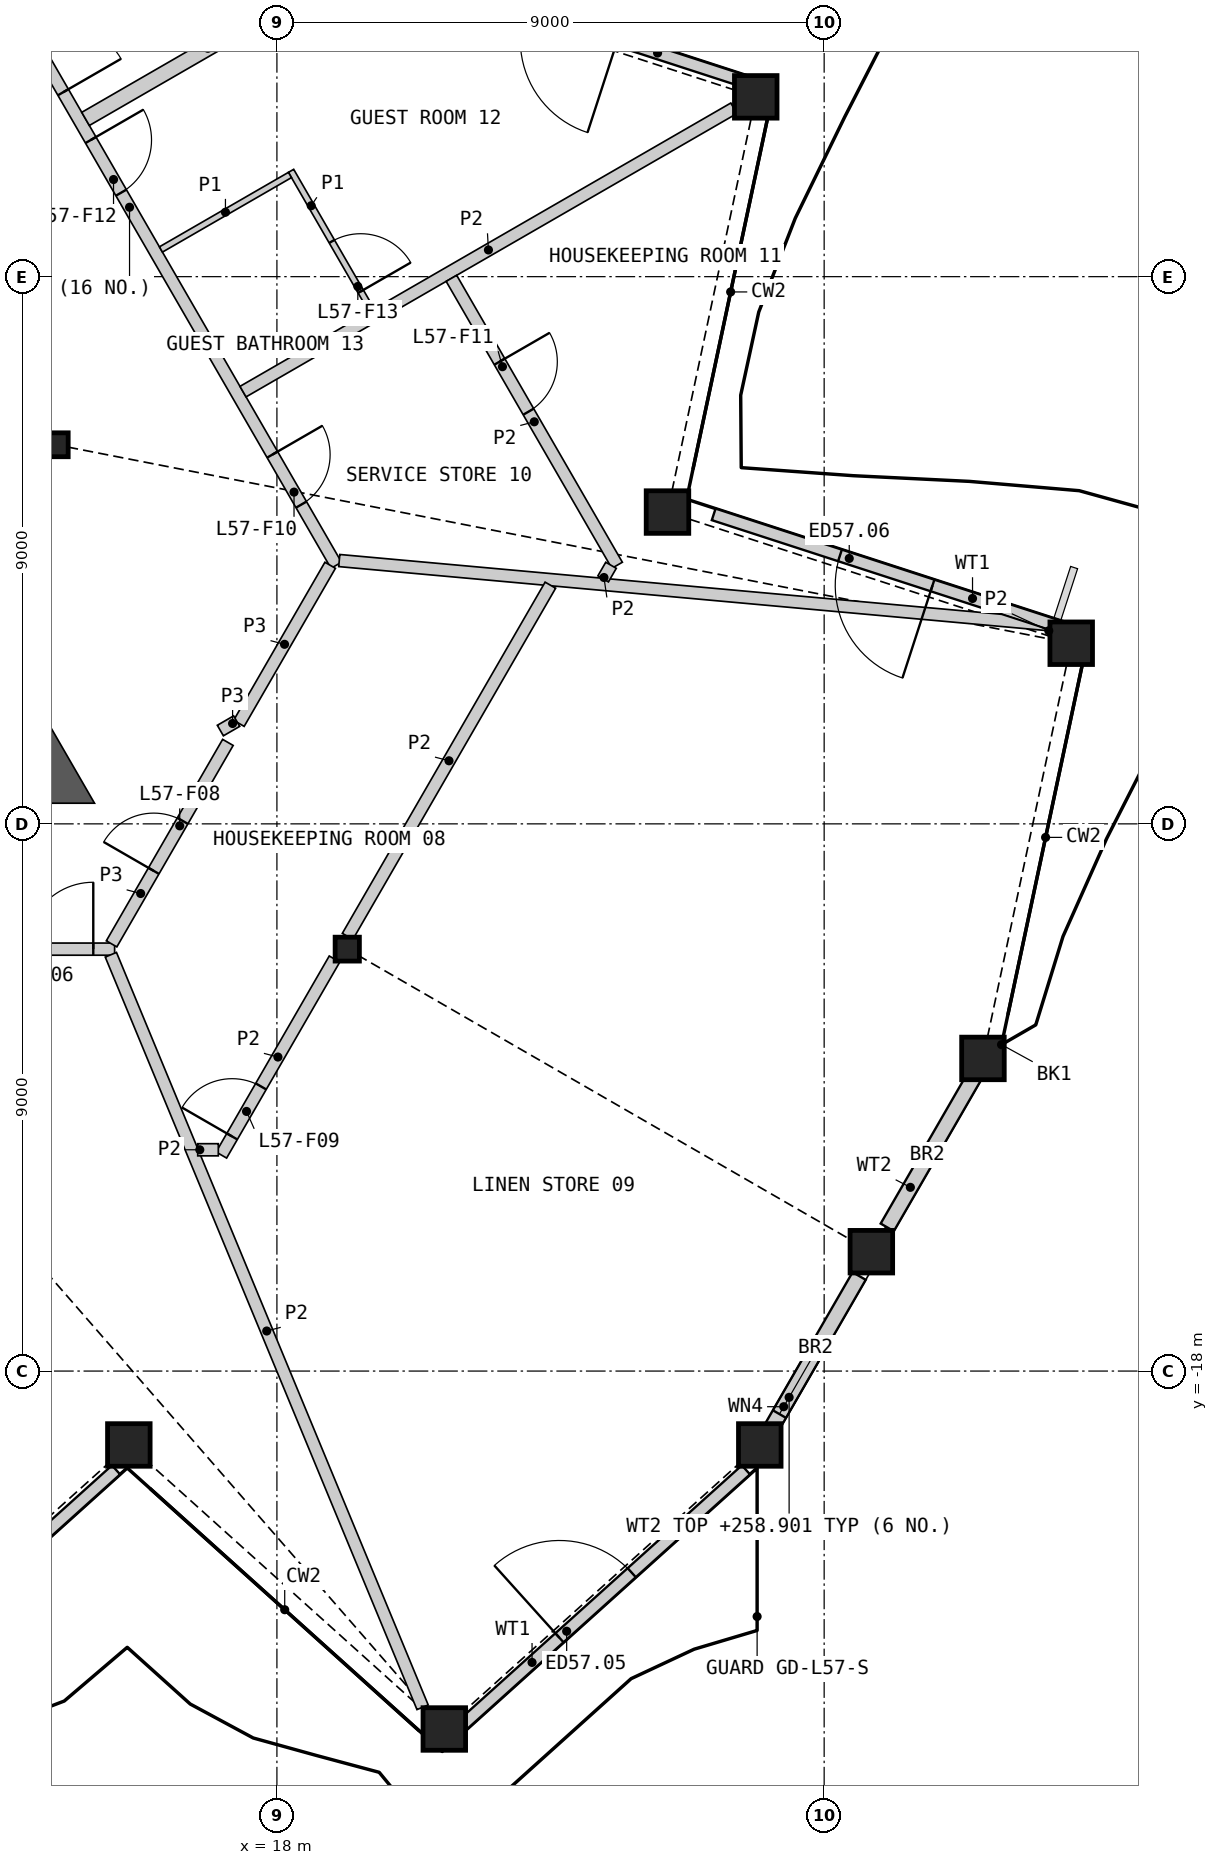
"""IFC4 building model, lengths in metres.
Left out: names, types, materials, properties, quantities, classifications, styles, units other than length and angle.
Written with IfcOpenShell. Run it as: python <this file> out.ifc"""

import sys

from ifc_helpers import new_model, si_unit, direction, frame, frame_2d, origin, origin_2d, place, context, subcontext, project, spatial, polyline, rectangle, hollow_rectangle, i_section, outline, extrude, element, fill, save


model = new_model("IFC4")
c1 = context("Model", 3, precision=1e-05, world=origin(), true_north=direction((0.0, 1.0)))
c2 = subcontext(c1, "Body", "Model", "MODEL_VIEW")
j1 = project(units=[si_unit("LENGTHUNIT", "METRE"), si_unit("PLANEANGLEUNIT", "RADIAN")], contexts=[c1])
p1 = place(None, origin())
s1 = spatial("IfcSite", under=j1, at=p1, CompositionType="ELEMENT")
p2 = place(p1, origin())
s2 = spatial("IfcBuilding", under=s1, at=p2, CompositionType="ELEMENT")
p3 = place(p2, frame((0.0, 0.0, 256.2)))
s3 = spatial("IfcBuildingStorey", under=s2, at=p3, CompositionType="ELEMENT", Elevation=256.2)
for number, where, z_axis, x_axis in (
    (1, (15.565, -19.215, 0.0), (0.0, 0.0, 1.0), (1.0, 0.0, 0.0)),
    (2, (20.753, -23.887, 0.0), (0.0, 0.0, 1.0), (1.0, 0.0, 0.0)),
    (3, (25.941, -19.215, 0.0), (0.0, 0.0, 1.0), (1.0, 0.0, 0.0)),
    (4, (27.776, -16.037, 0.0), (0.0, 0.0, 1.0), (1.0, 0.0, 0.0)),
    (5, (29.612, -12.858, 0.0), (0.0, 0.0, 1.0), (1.0, 0.0, 0.0)),
    (6, (31.063, -6.029, 0.0), (0.0, 0.0, 1.0), (1.0, 0.0, 0.0)),
    (7, (24.423, -3.872, 0.0), (0.0, 0.0, 1.0), (1.0, 0.0, 0.0)),
    (8, (25.875, 2.957, 0.0), (0.0, 0.0, 1.0), (1.0, 0.0, 0.0)),
):
    element("IfcColumn", number, at=place(p3, frame(where, z_axis=z_axis, x_axis=x_axis)), inside=s3, PredefinedType="COLUMN", context=c2, shape_type="SweptSolid", body=[
        extrude(hollow_rectangle(XDim=0.7, YDim=0.7, WallThickness=0.045, at=origin_2d()), origin(), (0.0, 0.0, 1.0), 3.6),
    ])
for number, where, z_axis, x_axis in (
    (9, (19.157, -11.06, 0.0), (0.0, 0.0, 1.0), (1.0, 0.0, 0.0)),
    (10, (14.368, -2.765, 0.0), (0.0, 0.0, 1.0), (1.0, 0.0, 0.0)),
):
    element("IfcColumn", number, at=place(p3, frame(where, z_axis=z_axis, x_axis=x_axis)), inside=s3, PredefinedType="COLUMN", context=c2, shape_type="SweptSolid", body=[
        extrude(i_section(OverallWidth=0.399, OverallDepth=0.393, WebThickness=0.023, FlangeThickness=0.037, at=origin_2d()), origin(), (0.0, 0.0, 1.0), 3.6),
    ])
p4 = place(p3, frame((10.664, -23.848, 0.0), z_axis=(0.0, 0.0, 1.0), x_axis=(0.74314024121, 0.669135697668, 0.0)))
e11 = element("IfcWall", 11, at=p4, inside=s3, PredefinedType="SOLIDWALL", context=c2, shape_type="SweptSolid", body=[
    extrude(rectangle(XDim=6.311, YDim=0.2, at=frame_2d((3.156, 0.0))), origin(), (0.0, 0.0, 1.0), 2.701),
])
p5 = place(p4, frame((2.184, 0.0, 0.0)))
e12 = element("IfcOpeningElement", 12, at=p5, cuts=e11, PredefinedType="OPENING", context=c2, shape_type="SweptSolid", body=[
    extrude(rectangle(XDim=1.6, YDim=2.4, at=frame_2d((0.8, 1.2))), frame((0.0, 0.11, 0.0), z_axis=(0.0, -1.0, 0.0), x_axis=(1.0, 0.0, 0.0)), (0.0, 0.0, 1.0), 0.22),
])
p6 = place(p3, frame((21.023, -23.848, 0.0), z_axis=(0.0, 0.0, 1.0), x_axis=(0.74314024121, 0.669135697668, 0.0)))
e13 = element("IfcWall", 13, at=p6, inside=s3, PredefinedType="SOLIDWALL", context=c2, shape_type="SweptSolid", body=[
    extrude(rectangle(XDim=6.311, YDim=0.2, at=frame_2d((3.156, 0.0))), origin(), (0.0, 0.0, 1.0), 2.701),
])
p7 = place(p6, frame((2.184, 0.0, 0.0)))
e14 = element("IfcOpeningElement", 14, at=p7, cuts=e13, PredefinedType="OPENING", context=c2, shape_type="SweptSolid", body=[
    extrude(rectangle(XDim=1.6, YDim=2.4, at=frame_2d((0.8, 1.2))), frame((0.0, 0.11, 0.0), z_axis=(0.0, -1.0, 0.0), x_axis=(1.0, 0.0, 0.0)), (0.0, 0.0, 1.0), 0.22),
])
p8 = place(p3, frame((26.04, -19.097, 0.0), z_axis=(0.0, 0.0, 1.0), x_axis=(0.499976998774, 0.866038683141, 0.0)))
e15 = element("IfcWall", 15, at=p8, inside=s3, PredefinedType="SOLIDWALL", context=c2, shape_type="SweptSolid", body=[
    extrude(rectangle(XDim=3.072, YDim=0.25, at=frame_2d((1.536, 0.0))), origin(), (0.0, 0.0, 1.0), 2.701),
])
p9 = place(p8, frame((0.45, 0.0, 1.8)))
e16 = element("IfcOpeningElement", 16, at=p9, cuts=e15, PredefinedType="OPENING", context=c2, shape_type="SweptSolid", body=[
    extrude(rectangle(XDim=1.4, YDim=0.7, at=frame_2d((0.7, 0.35))), frame((0.0, 0.135, 0.0), z_axis=(0.0, -1.0, 0.0), x_axis=(1.0, 0.0, 0.0)), (0.0, 0.0, 1.0), 0.27),
])
p10 = place(p3, frame((28.038, -15.637, 0.0), z_axis=(0.0, 0.0, 1.0), x_axis=(0.500023511883, 0.866011828767, 0.0)))
e17 = element("IfcWall", 17, at=p10, inside=s3, PredefinedType="SOLIDWALL", context=c2, shape_type="SweptSolid", body=[
    extrude(rectangle(XDim=3.042, YDim=0.25, at=frame_2d((1.521, 0.0))), origin(), (0.0, 0.0, 1.0), 2.701),
])
p11 = place(p3, frame((30.859, -5.754, 0.0), z_axis=(0.0, 0.0, 1.0), x_axis=(-0.951049400374, 0.309038894069, 0.0)))
e18 = element("IfcWall", 18, at=p11, inside=s3, PredefinedType="SOLIDWALL", context=c2, shape_type="SweptSolid", body=[
    extrude(rectangle(XDim=5.968, YDim=0.2, at=frame_2d((2.984, 0.0))), origin(), (0.0, 0.0, 1.0), 2.701),
])
p12 = place(p11, frame((2.184, 0.0, 0.0)))
e19 = element("IfcOpeningElement", 19, at=p12, cuts=e18, PredefinedType="OPENING", context=c2, shape_type="SweptSolid", body=[
    extrude(rectangle(XDim=1.6, YDim=2.4, at=frame_2d((0.8, 1.2))), frame((0.0, 0.11, 0.0), z_axis=(0.0, -1.0, 0.0), x_axis=(1.0, 0.0, 0.0)), (0.0, 0.0, 1.0), 0.22),
])
p13 = place(p3, frame((25.679, 3.217, 0.0), z_axis=(0.0, 0.0, 1.0), x_axis=(-0.951049400374, 0.309038894069, 0.0)))
e20 = element("IfcWall", 20, at=p13, inside=s3, PredefinedType="SOLIDWALL", context=c2, shape_type="SweptSolid", body=[
    extrude(rectangle(XDim=5.968, YDim=0.2, at=frame_2d((2.984, 0.0))), origin(), (0.0, 0.0, 1.0), 2.701),
])
p14 = place(p13, frame((2.184, 0.0, 0.0)))
e21 = element("IfcOpeningElement", 21, at=p14, cuts=e20, PredefinedType="OPENING", context=c2, shape_type="SweptSolid", body=[
    extrude(rectangle(XDim=1.6, YDim=2.4, at=frame_2d((0.8, 1.2))), frame((0.0, 0.11, 0.0), z_axis=(0.0, -1.0, 0.0), x_axis=(1.0, 0.0, 0.0)), (0.0, 0.0, 1.0), 0.22),
])
p15 = place(p3, origin())
e22 = element("IfcWall", 22, at=p15, inside=s3, PredefinedType="SHEAR", context=c2, shape_type="SweptSolid", body=[
    extrude(outline(polyline([(12.748, -8.66), (12.748, -7.36), (13.874, -6.71), (15.0, -8.66), (12.748, -8.66)])), origin(), (0.0, 0.0, 1.0), 3.25),
])
p16 = place(p3, frame((5.377, 18.807, 0.0), z_axis=(0.0, 0.0, 1.0), x_axis=(0.499999852422, -0.866025488988, 0.0)))
e23 = element("IfcWall", 23, at=p16, inside=s3, PredefinedType="PARTITIONING", context=c2, shape_type="SweptSolid", body=[
    extrude(rectangle(XDim=27.198, YDim=0.2, at=frame_2d((13.599, 0.0))), origin(), (0.0, 0.0, 1.0), 3.25),
])
p17 = place(p16, frame((25.096, 0.0, 0.0)))
e24 = element("IfcOpeningElement", 24, at=p17, cuts=e23, PredefinedType="OPENING", context=c2, shape_type="SweptSolid", body=[
    extrude(rectangle(XDim=0.95, YDim=2.1, at=frame_2d((0.475, 1.05))), frame((0.0, 0.11, 0.0), z_axis=(0.0, -1.0, 0.0), x_axis=(1.0, 0.0, 0.0)), (0.0, 0.0, 1.0), 0.22),
])
p18 = place(p16, frame((19.122, 0.0, 0.0)))
e25 = element("IfcOpeningElement", 25, at=p18, cuts=e23, PredefinedType="OPENING", context=c2, shape_type="SweptSolid", body=[
    extrude(rectangle(XDim=1.0, YDim=2.1, at=frame_2d((0.5, 1.05))), frame((0.0, 0.11, 0.0), z_axis=(0.0, -1.0, 0.0), x_axis=(1.0, 0.0, 0.0)), (0.0, 0.0, 1.0), 0.22),
])
p19 = place(p16, frame((17.115, 0.0, 0.0)))
e26 = element("IfcOpeningElement", 26, at=p19, cuts=e23, PredefinedType="OPENING", context=c2, shape_type="SweptSolid", body=[
    extrude(rectangle(XDim=1.1, YDim=2.1, at=frame_2d((0.55, 1.05))), frame((0.0, 0.11, 0.0), z_axis=(0.0, -1.0, 0.0), x_axis=(1.0, 0.0, 0.0)), (0.0, 0.0, 1.0), 0.22),
])
p20 = place(p16, frame((0.35, 0.0, 0.0)))
e27 = element("IfcOpeningElement", 27, at=p20, cuts=e23, PredefinedType="OPENING", context=c2, shape_type="SweptSolid", body=[
    extrude(rectangle(XDim=1.1, YDim=2.1, at=frame_2d((0.55, 1.05))), frame((0.0, 0.11, 0.0), z_axis=(0.0, -1.0, 0.0), x_axis=(1.0, 0.0, 0.0)), (0.0, 0.0, 1.0), 0.22),
])
p21 = place(p3, frame((9.788, -11.06, 0.0), z_axis=(0.0, 0.0, 1.0), x_axis=(1.0, 0.0, 0.0)))
e28 = element("IfcWall", 28, at=p21, inside=s3, PredefinedType="PARTITIONING", context=c2, shape_type="SweptSolid", body=[
    extrude(rectangle(XDim=5.543, YDim=0.2, at=frame_2d((2.771, 0.0))), origin(), (0.0, 0.0, 1.0), 3.25),
])
p22 = place(p21, frame((4.092, 0.0, 0.0)))
e29 = element("IfcOpeningElement", 29, at=p22, cuts=e28, PredefinedType="OPENING", context=c2, shape_type="SweptSolid", body=[
    extrude(rectangle(XDim=1.1, YDim=2.1, at=frame_2d((0.55, 1.05))), frame((0.0, 0.11, 0.0), z_axis=(0.0, -1.0, 0.0), x_axis=(1.0, 0.0, 0.0)), (0.0, 0.0, 1.0), 0.22),
])
p23 = place(p3, frame((14.853, 2.594, 0.0), z_axis=(0.0, 0.0, 1.0), x_axis=(0.866021891294, 0.500006083763, 0.0)))
e30 = element("IfcWall", 30, at=p23, inside=s3, PredefinedType="PARTITIONING", context=c2, shape_type="SweptSolid", body=[
    extrude(rectangle(XDim=4.645, YDim=0.25, at=frame_2d((2.322, 0.0))), origin(), (0.0, 0.0, 1.0), 2.404),
])
p24 = place(p3, frame((15.281, -10.974, 0.0), z_axis=(0.0, 0.0, 1.0), x_axis=(0.499989446428, 0.866031496806, 0.0)))
e31 = element("IfcWall", 31, at=p24, inside=s3, PredefinedType="PARTITIONING", context=c2, shape_type="SweptSolid", body=[
    extrude(rectangle(XDim=3.826, YDim=0.2, at=frame_2d((1.913, 0.0))), origin(), (0.0, 0.0, 1.0), 3.25),
])
p25 = place(p24, frame((1.386, 0.0, 0.0)))
e32 = element("IfcOpeningElement", 32, at=p25, cuts=e31, PredefinedType="OPENING", context=c2, shape_type="SweptSolid", body=[
    extrude(rectangle(XDim=0.95, YDim=2.1, at=frame_2d((0.475, 1.05))), frame((0.0, 0.11, 0.0), z_axis=(0.0, -1.0, 0.0), x_axis=(1.0, 0.0, 0.0)), (0.0, 0.0, 1.0), 0.22),
])
p26 = place(p3, frame((17.375, -7.347, 0.0), z_axis=(0.0, 0.0, 1.0), x_axis=(0.499952404951, 0.866052881055, 0.0)))
e33 = element("IfcWall", 33, at=p26, inside=s3, PredefinedType="PARTITIONING", context=c2, shape_type="SweptSolid", body=[
    extrude(rectangle(XDim=3.002, YDim=0.2, at=frame_2d((1.501, 0.0))), origin(), (0.0, 0.0, 1.0), 3.25),
])
p27 = place(p3, frame((17.07, -7.465, 0.0), z_axis=(0.0, 0.0, 1.0), x_axis=(0.866054481515, 0.499949632511, 0.0)))
e34 = element("IfcWall", 34, at=p27, inside=s3, PredefinedType="PARTITIONING", context=c2, shape_type="SweptSolid", body=[
    extrude(rectangle(XDim=0.31, YDim=0.2, at=frame_2d((0.155, 0.0))), origin(), (0.0, 0.0, 1.0), 3.25),
])
p28 = place(p3, frame((15.269, -11.153, 0.0), z_axis=(0.0, 0.0, 1.0), x_axis=(0.382692998932, -0.923875569851, 0.0)))
e35 = element("IfcWall", 35, at=p28, inside=s3, PredefinedType="PARTITIONING", context=c2, shape_type="SweptSolid", body=[
    extrude(rectangle(XDim=13.397, YDim=0.2, at=frame_2d((6.698, 0.0))), origin(), (0.0, 0.0, 1.0), 2.404),
])
p29 = place(p3, origin())
e36 = element("IfcWall", 36, at=p29, inside=s3, PredefinedType="PARTITIONING", context=c2, shape_type="SweptSolid", body=[
    extrude(outline(polyline([(30.694, -5.824), (19.017, -4.769), (19.034, -4.57), (29.918, -5.553), (30.696, -5.806), (30.694, -5.824)])), origin(), (0.0, 0.0, 1.0), 2.404),
])
p30 = place(p3, frame((17.443, -1.891, 0.0), z_axis=(0.0, 0.0, 1.0), x_axis=(0.866019838429, 0.500009639354, 0.0)))
e37 = element("IfcWall", 37, at=p30, inside=s3, PredefinedType="PARTITIONING", context=c2, shape_type="SweptSolid", body=[
    extrude(rectangle(XDim=9.321, YDim=0.2, at=frame_2d((4.661, 0.0))), origin(), (0.0, 0.0, 1.0), 2.404),
])
p31 = place(p3, frame((19.162, -10.851, 0.0), z_axis=(0.0, 0.0, 1.0), x_axis=(0.500008654708, 0.866020406929, 0.0)))
e38 = element("IfcWall", 38, at=p31, inside=s3, PredefinedType="PARTITIONING", context=c2, shape_type="SweptSolid", body=[
    extrude(rectangle(XDim=6.67, YDim=0.2, at=frame_2d((3.335, 0.0))), origin(), (0.0, 0.0, 1.0), 2.404),
])
p32 = place(p3, frame((20.87, -0.028, 0.0), z_axis=(0.0, 0.0, 1.0), x_axis=(0.499993928037, -0.866028909405, 0.0)))
e39 = element("IfcWall", 39, at=p32, inside=s3, PredefinedType="PARTITIONING", context=c2, shape_type="SweptSolid", body=[
    extrude(rectangle(XDim=5.449, YDim=0.2, at=frame_2d((2.725, 0.0))), origin(), (0.0, 0.0, 1.0), 2.404),
])
p33 = place(p32, frame((1.583, 0.0, 0.0)))
e40 = element("IfcOpeningElement", 40, at=p33, cuts=e39, PredefinedType="OPENING", context=c2, shape_type="SweptSolid", body=[
    extrude(rectangle(XDim=0.95, YDim=2.1, at=frame_2d((0.475, 1.05))), frame((0.0, 0.11, 0.0), z_axis=(0.0, -1.0, 0.0), x_axis=(1.0, 0.0, 0.0)), (0.0, 0.0, 1.0), 0.22),
])
p34 = place(p3, frame((17.086, -14.447, 0.0), z_axis=(0.0, 0.0, 1.0), x_axis=(0.500004411858, 0.866022856582, 0.0)))
e41 = element("IfcWall", 41, at=p34, inside=s3, PredefinedType="PARTITIONING", context=c2, shape_type="SweptSolid", body=[
    extrude(rectangle(XDim=3.723, YDim=0.2, at=frame_2d((1.861, 0.0))), origin(), (0.0, 0.0, 1.0), 2.404),
])
p35 = place(p34, frame((0.353, 0.0, 0.0)))
e42 = element("IfcOpeningElement", 42, at=p35, cuts=e41, PredefinedType="OPENING", context=c2, shape_type="SweptSolid", body=[
    extrude(rectangle(XDim=0.95, YDim=2.1, at=frame_2d((0.475, 1.05))), frame((0.0, 0.11, 0.0), z_axis=(0.0, -1.0, 0.0), x_axis=(1.0, 0.0, 0.0)), (0.0, 0.0, 1.0), 0.22),
])
p36 = place(p3, frame((16.698, -14.36, 0.0), z_axis=(0.0, 0.0, 1.0), x_axis=(1.0, 0.0, 0.0)))
e43 = element("IfcWall", 43, at=p36, inside=s3, PredefinedType="PARTITIONING", context=c2, shape_type="SweptSolid", body=[
    extrude(rectangle(XDim=0.338, YDim=0.2, at=frame_2d((0.169, 0.0))), origin(), (0.0, 0.0, 1.0), 2.404),
])
p37 = place(p3, frame((23.366, -4.97, 0.0), z_axis=(0.0, 0.0, 1.0), x_axis=(0.500104332946, 0.86596515875, 0.0)))
e44 = element("IfcWall", 44, at=p37, inside=s3, PredefinedType="PARTITIONING", context=c2, shape_type="SweptSolid", body=[
    extrude(rectangle(XDim=0.258, YDim=0.2, at=frame_2d((0.129, 0.0))), origin(), (0.0, 0.0, 1.0), 2.404),
])
p38 = place(p3, frame((18.233, 1.74, 0.0), z_axis=(0.0, 0.0, 1.0), x_axis=(0.499993606316, -0.866029095148, 0.0)))
e45 = element("IfcWall", 45, at=p38, inside=s3, PredefinedType="PARTITIONING", context=c2, shape_type="SweptSolid", body=[
    extrude(rectangle(XDim=2.65, YDim=0.1, at=frame_2d((1.325, 0.0))), origin(), (0.0, 0.0, 1.0), 2.404),
])
p39 = place(p38, frame((1.341, 0.0, 0.0)))
e46 = element("IfcOpeningElement", 46, at=p39, cuts=e45, PredefinedType="OPENING", context=c2, shape_type="SweptSolid", body=[
    extrude(rectangle(XDim=0.95, YDim=2.1, at=frame_2d((0.475, 1.05))), frame((0.0, 0.06, 0.0), z_axis=(0.0, -1.0, 0.0), x_axis=(1.0, 0.0, 0.0)), (0.0, 0.0, 1.0), 0.12),
])
p40 = place(p3, frame((16.093, 0.447, 0.0), z_axis=(0.0, 0.0, 1.0), x_axis=(0.866057815567, 0.499943856944, 0.0)))
e47 = element("IfcWall", 47, at=p40, inside=s3, PredefinedType="PARTITIONING", context=c2, shape_type="SweptSolid", body=[
    extrude(rectangle(XDim=2.45, YDim=0.1, at=frame_2d((1.225, 0.0))), origin(), (0.0, 0.0, 1.0), 2.404),
])
p41 = place(p7, origin())
e48 = element("IfcDoor", 48, at=p41, inside=s3, OperationType="DOUBLE_DOOR_SINGLE_SWING", PredefinedType="DOOR", context=c2, shape_type="SweptSolid", body=[
    extrude(rectangle(XDim=1.6, YDim=2.4, at=frame_2d((0.8, 1.2))), frame((0.0, 0.025, 0.0), z_axis=(0.0, -1.0, 0.0), x_axis=(1.0, 0.0, 0.0)), (0.0, 0.0, 1.0), 0.05),
])
fill(e14, e48)
p42 = place(p9, origin())
e49 = element("IfcWindow", 49, at=p42, inside=s3, PartitioningType="SINGLE_PANEL", PredefinedType="WINDOW", context=c2, shape_type="SweptSolid", body=[
    extrude(rectangle(XDim=1.4, YDim=0.7, at=frame_2d((0.7, 0.35))), frame((0.0, 0.03, 0.0), z_axis=(0.0, -1.0, 0.0), x_axis=(1.0, 0.0, 0.0)), (0.0, 0.0, 1.0), 0.06),
])
fill(e16, e49)
p43 = place(p12, origin())
e50 = element("IfcDoor", 50, at=p43, inside=s3, OperationType="DOUBLE_DOOR_SINGLE_SWING", PredefinedType="DOOR", context=c2, shape_type="SweptSolid", body=[
    extrude(rectangle(XDim=1.6, YDim=2.4, at=frame_2d((0.8, 1.2))), frame((0.0, 0.025, 0.0), z_axis=(0.0, -1.0, 0.0), x_axis=(1.0, 0.0, 0.0)), (0.0, 0.0, 1.0), 0.05),
])
fill(e19, e50)
p44 = place(p22, origin())
e51 = element("IfcDoor", 51, at=p44, inside=s3, OperationType="SINGLE_SWING_RIGHT", PredefinedType="DOOR", context=c2, shape_type="SweptSolid", body=[
    extrude(rectangle(XDim=1.1, YDim=2.1, at=frame_2d((0.55, 1.05))), frame((0.0, 0.025, 0.0), z_axis=(0.0, -1.0, 0.0), x_axis=(1.0, 0.0, 0.0)), (0.0, 0.0, 1.0), 0.05),
])
fill(e29, e51)
p45 = place(p25, origin())
e52 = element("IfcDoor", 52, at=p45, inside=s3, OperationType="SINGLE_SWING_LEFT", PredefinedType="DOOR", context=c2, shape_type="SweptSolid", body=[
    extrude(rectangle(XDim=0.95, YDim=2.1, at=frame_2d((0.475, 1.05))), frame((0.0, 0.025, 0.0), z_axis=(0.0, -1.0, 0.0), x_axis=(1.0, 0.0, 0.0)), (0.0, 0.0, 1.0), 0.05),
])
fill(e32, e52)
p46 = place(p35, origin())
e53 = element("IfcDoor", 53, at=p46, inside=s3, OperationType="SINGLE_SWING_LEFT", PredefinedType="DOOR", context=c2, shape_type="SweptSolid", body=[
    extrude(rectangle(XDim=0.95, YDim=2.1, at=frame_2d((0.475, 1.05))), frame((0.0, 0.025, 0.0), z_axis=(0.0, -1.0, 0.0), x_axis=(1.0, 0.0, 0.0)), (0.0, 0.0, 1.0), 0.05),
])
fill(e42, e53)
p47 = place(p17, origin())
e54 = element("IfcDoor", 54, at=p47, inside=s3, OperationType="SINGLE_SWING_LEFT", PredefinedType="DOOR", context=c2, shape_type="SweptSolid", body=[
    extrude(rectangle(XDim=0.95, YDim=2.1, at=frame_2d((0.475, 1.05))), frame((0.0, 0.025, 0.0), z_axis=(0.0, -1.0, 0.0), x_axis=(1.0, 0.0, 0.0)), (0.0, 0.0, 1.0), 0.05),
])
fill(e24, e54)
p48 = place(p33, origin())
e55 = element("IfcDoor", 55, at=p48, inside=s3, OperationType="SINGLE_SWING_LEFT", PredefinedType="DOOR", context=c2, shape_type="SweptSolid", body=[
    extrude(rectangle(XDim=0.95, YDim=2.1, at=frame_2d((0.475, 1.05))), frame((0.0, 0.025, 0.0), z_axis=(0.0, -1.0, 0.0), x_axis=(1.0, 0.0, 0.0)), (0.0, 0.0, 1.0), 0.05),
])
fill(e40, e55)
p49 = place(p18, origin())
e56 = element("IfcDoor", 56, at=p49, inside=s3, OperationType="SINGLE_SWING_LEFT", PredefinedType="DOOR", context=c2, shape_type="SweptSolid", body=[
    extrude(rectangle(XDim=1.0, YDim=2.1, at=frame_2d((0.5, 1.05))), frame((0.0, 0.025, 0.0), z_axis=(0.0, -1.0, 0.0), x_axis=(1.0, 0.0, 0.0)), (0.0, 0.0, 1.0), 0.05),
])
fill(e25, e56)
p50 = place(p39, origin())
e57 = element("IfcDoor", 57, at=p50, inside=s3, OperationType="SINGLE_SWING_RIGHT", PredefinedType="DOOR", context=c2, shape_type="SweptSolid", body=[
    extrude(rectangle(XDim=0.95, YDim=2.1, at=frame_2d((0.475, 1.05))), frame((0.0, 0.025, 0.0), z_axis=(0.0, -1.0, 0.0), x_axis=(1.0, 0.0, 0.0)), (0.0, 0.0, 1.0), 0.05),
])
fill(e46, e57)
p51 = place(p19, origin())
e58 = element("IfcDoor", 58, at=p51, inside=s3, OperationType="SINGLE_SWING_RIGHT", PredefinedType="DOOR", context=c2, shape_type="SweptSolid", body=[
    extrude(rectangle(XDim=1.1, YDim=2.1, at=frame_2d((0.55, 1.05))), frame((0.0, 0.025, 0.0), z_axis=(0.0, -1.0, 0.0), x_axis=(1.0, 0.0, 0.0)), (0.0, 0.0, 1.0), 0.05),
])
fill(e26, e58)
save(model, sys.argv[1])
